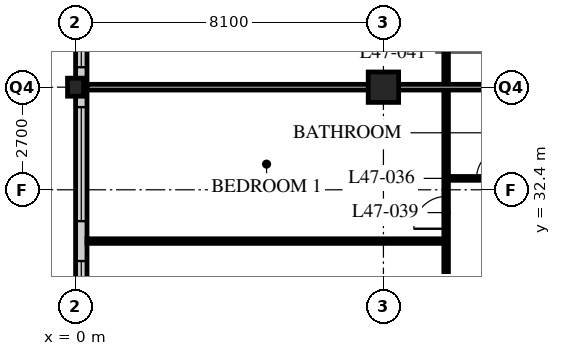
"""IFC4 building model, lengths in metres.
Left out: names, types, materials, properties, quantities, classifications, styles, units other than length and angle.
Written with IfcOpenShell. Run it as: python <this file> out.ifc"""

import sys

from ifc_helpers import new_model, si_unit, direction, frame, frame_2d, origin, origin_2d, place, context, subcontext, project, spatial, rectangle, hollow_rectangle, i_section, extrude, element, fill, save


model = new_model("IFC4")
c1 = context("Model", 3, precision=1e-05, world=origin(), true_north=direction((0.0, 1.0)))
c2 = subcontext(c1, "Body", "Model", "MODEL_VIEW")
j1 = project(units=[si_unit("LENGTHUNIT", "METRE"), si_unit("PLANEANGLEUNIT", "RADIAN")], contexts=[c1])
p1 = place(None, origin())
s1 = spatial("IfcSite", under=j1, at=p1, CompositionType="ELEMENT")
p2 = place(p1, origin())
s2 = spatial("IfcBuilding", under=s1, at=p2, CompositionType="ELEMENT")
p3 = place(p2, frame((0.0, 0.0, 184.8)))
s3 = spatial("IfcBuildingStorey", under=s2, at=p3, CompositionType="ELEMENT", Elevation=184.8)
p4 = place(p3, frame((0.0, 35.1, 0.0), z_axis=(0.0, 0.0, 1.0), x_axis=(1.0, 0.0, 0.0)))
e1 = element("IfcColumn", 1, at=p4, inside=s3, PredefinedType="COLUMN", context=c2, shape_type="SweptSolid", body=[
    extrude(i_section(OverallWidth=0.424, OverallDepth=0.475, WebThickness=0.048, FlangeThickness=0.077, FilletRadius=0.015, at=origin_2d()), origin(), (0.0, 0.0, 1.0), 3.6),
])
p5 = place(p3, frame((8.1, 35.1, 0.0), z_axis=(0.0, 0.0, 1.0), x_axis=(1.0, 0.0, 0.0)))
e2 = element("IfcColumn", 2, at=p5, inside=s3, PredefinedType="COLUMN", context=c2, shape_type="SweptSolid", body=[
    extrude(hollow_rectangle(XDim=0.8, YDim=0.8, WallThickness=0.08, at=origin_2d()), origin(), (0.0, 0.0, 1.0), 3.6),
])
p6 = place(p3, frame((0.15, 51.0, 0.0), z_axis=(0.0, 0.0, 1.0), x_axis=(0.0, -1.0, 0.0)))
e3 = element("IfcWall", 3, at=p6, inside=s3, PredefinedType="SOLIDWALL", context=c2, shape_type="SweptSolid", body=[
    extrude(rectangle(XDim=32.1, YDim=0.3, at=frame_2d((16.05, 0.0))), origin(), (0.0, 0.0, 1.0), 3.39),
])
p7 = place(p6, frame((0.225, 0.0, 0.6)))
e4 = element("IfcOpeningElement", 4, at=p7, cuts=e3, PredefinedType="OPENING", context=c2, shape_type="SweptSolid", body=[
    extrude(rectangle(XDim=3.0, YDim=2.4, at=frame_2d((1.5, 1.2))), frame((0.0, 0.16, 0.0), z_axis=(0.0, -1.0, 0.0), x_axis=(1.0, 0.0, 0.0)), (0.0, 0.0, 1.0), 0.32),
])
p8 = place(p6, frame((4.275, 0.0, 0.6)))
e5 = element("IfcOpeningElement", 5, at=p8, cuts=e3, PredefinedType="OPENING", context=c2, shape_type="SweptSolid", body=[
    extrude(rectangle(XDim=3.0, YDim=2.4, at=frame_2d((1.5, 1.2))), frame((0.0, 0.16, 0.0), z_axis=(0.0, -1.0, 0.0), x_axis=(1.0, 0.0, 0.0)), (0.0, 0.0, 1.0), 0.32),
])
p9 = place(p6, frame((8.325, 0.0, 0.6)))
e6 = element("IfcOpeningElement", 6, at=p9, cuts=e3, PredefinedType="OPENING", context=c2, shape_type="SweptSolid", body=[
    extrude(rectangle(XDim=3.0, YDim=2.4, at=frame_2d((1.5, 1.2))), frame((0.0, 0.16, 0.0), z_axis=(0.0, -1.0, 0.0), x_axis=(1.0, 0.0, 0.0)), (0.0, 0.0, 1.0), 0.32),
])
p10 = place(p6, frame((12.375, 0.0, 0.6)))
e7 = element("IfcOpeningElement", 7, at=p10, cuts=e3, PredefinedType="OPENING", context=c2, shape_type="SweptSolid", body=[
    extrude(rectangle(XDim=3.0, YDim=2.4, at=frame_2d((1.5, 1.2))), frame((0.0, 0.16, 0.0), z_axis=(0.0, -1.0, 0.0), x_axis=(1.0, 0.0, 0.0)), (0.0, 0.0, 1.0), 0.32),
])
p11 = place(p6, frame((16.425, 0.0, 0.6)))
e8 = element("IfcOpeningElement", 8, at=p11, cuts=e3, PredefinedType="OPENING", context=c2, shape_type="SweptSolid", body=[
    extrude(rectangle(XDim=3.0, YDim=2.4, at=frame_2d((1.5, 1.2))), frame((0.0, 0.16, 0.0), z_axis=(0.0, -1.0, 0.0), x_axis=(1.0, 0.0, 0.0)), (0.0, 0.0, 1.0), 0.32),
])
p12 = place(p6, frame((20.475, 0.0, 0.6)))
e9 = element("IfcOpeningElement", 9, at=p12, cuts=e3, PredefinedType="OPENING", context=c2, shape_type="SweptSolid", body=[
    extrude(rectangle(XDim=3.0, YDim=2.4, at=frame_2d((1.5, 1.2))), frame((0.0, 0.16, 0.0), z_axis=(0.0, -1.0, 0.0), x_axis=(1.0, 0.0, 0.0)), (0.0, 0.0, 1.0), 0.32),
])
p13 = place(p6, frame((24.525, 0.0, 0.6)))
e10 = element("IfcOpeningElement", 10, at=p13, cuts=e3, PredefinedType="OPENING", context=c2, shape_type="SweptSolid", body=[
    extrude(rectangle(XDim=3.0, YDim=2.4, at=frame_2d((1.5, 1.2))), frame((0.0, 0.16, 0.0), z_axis=(0.0, -1.0, 0.0), x_axis=(1.0, 0.0, 0.0)), (0.0, 0.0, 1.0), 0.32),
])
p14 = place(p6, frame((28.575, 0.0, 0.6)))
e11 = element("IfcOpeningElement", 11, at=p14, cuts=e3, PredefinedType="OPENING", context=c2, shape_type="SweptSolid", body=[
    extrude(rectangle(XDim=3.0, YDim=2.4, at=frame_2d((1.5, 1.2))), frame((0.0, 0.16, 0.0), z_axis=(0.0, -1.0, 0.0), x_axis=(1.0, 0.0, 0.0)), (0.0, 0.0, 1.0), 0.32),
])
p15 = place(p3, frame((9.75, 27.0, 0.0), z_axis=(0.0, 0.0, 1.0), x_axis=(0.0, 1.0, 0.0)))
e12 = element("IfcWall", 12, at=p15, inside=s3, PredefinedType="PARTITIONING", context=c2, shape_type="SweptSolid", body=[
    extrude(rectangle(XDim=16.2, YDim=0.12, at=frame_2d((8.1, 0.0))), origin(), (0.0, 0.0, 1.0), 3.39),
])
p16 = place(p15, frame((0.975, 0.0, 0.0)))
e13 = element("IfcOpeningElement", 13, at=p16, cuts=e12, PredefinedType="OPENING", context=c2, shape_type="SweptSolid", body=[
    extrude(rectangle(XDim=0.85, YDim=2.1, at=frame_2d((0.425, 1.05))), frame((0.0, 0.07, 0.0), z_axis=(0.0, -1.0, 0.0), x_axis=(1.0, 0.0, 0.0)), (0.0, 0.0, 1.0), 0.14),
])
p17 = place(p15, frame((4.375, 0.0, 0.0)))
e14 = element("IfcOpeningElement", 14, at=p17, cuts=e12, PredefinedType="OPENING", context=c2, shape_type="SweptSolid", body=[
    extrude(rectangle(XDim=0.85, YDim=2.1, at=frame_2d((0.425, 1.05))), frame((0.0, 0.07, 0.0), z_axis=(0.0, -1.0, 0.0), x_axis=(1.0, 0.0, 0.0)), (0.0, 0.0, 1.0), 0.14),
])
p18 = place(p15, frame((9.075, 0.0, 0.0)))
e15 = element("IfcOpeningElement", 15, at=p18, cuts=e12, PredefinedType="OPENING", context=c2, shape_type="SweptSolid", body=[
    extrude(rectangle(XDim=0.85, YDim=2.1, at=frame_2d((0.425, 1.05))), frame((0.0, 0.07, 0.0), z_axis=(0.0, -1.0, 0.0), x_axis=(1.0, 0.0, 0.0)), (0.0, 0.0, 1.0), 0.14),
])
p19 = place(p15, frame((12.475, 0.0, 0.0)))
e16 = element("IfcOpeningElement", 16, at=p19, cuts=e12, PredefinedType="OPENING", context=c2, shape_type="SweptSolid", body=[
    extrude(rectangle(XDim=0.85, YDim=2.1, at=frame_2d((0.425, 1.05))), frame((0.0, 0.07, 0.0), z_axis=(0.0, -1.0, 0.0), x_axis=(1.0, 0.0, 0.0)), (0.0, 0.0, 1.0), 0.14),
])
p20 = place(p3, frame((12.15, 32.7, 0.0), z_axis=(0.0, 0.0, 1.0), x_axis=(-1.0, 0.0, 0.0)))
e17 = element("IfcWall", 17, at=p20, inside=s3, PredefinedType="PARTITIONING", context=c2, shape_type="SweptSolid", body=[
    extrude(rectangle(XDim=2.4, YDim=0.1, at=frame_2d((1.2, 0.0))), origin(), (0.0, 0.0, 1.0), 3.39),
])
p21 = place(p20, frame((0.8, 0.0, 0.0)))
e18 = element("IfcOpeningElement", 18, at=p21, cuts=e17, PredefinedType="OPENING", context=c2, shape_type="SweptSolid", body=[
    extrude(rectangle(XDim=0.8, YDim=2.1, at=frame_2d((0.4, 1.05))), frame((0.0, 0.06, 0.0), z_axis=(0.0, -1.0, 0.0), x_axis=(1.0, 0.0, 0.0)), (0.0, 0.0, 1.0), 0.12),
])
p22 = place(p3, frame((9.75, 31.05, 0.0), z_axis=(0.0, 0.0, 1.0), x_axis=(-1.0, 0.0, 0.0)))
e19 = element("IfcWall", 19, at=p22, inside=s3, PredefinedType="PARTITIONING", context=c2, shape_type="SweptSolid", body=[
    extrude(rectangle(XDim=9.45, YDim=0.12, at=frame_2d((4.725, 0.0))), origin(), (0.0, 0.0, 1.0), 3.39),
])
p23 = place(p3, frame((12.15, 35.1, 0.0), z_axis=(0.0, 0.0, 1.0), x_axis=(-1.0, 0.0, 0.0)))
e20 = element("IfcWall", 20, at=p23, inside=s3, PredefinedType="PARTITIONING", context=c2, shape_type="SweptSolid", body=[
    extrude(rectangle(XDim=11.85, YDim=0.15, at=frame_2d((5.925, 0.0))), origin(), (0.0, 0.0, 1.0), 2.778),
])
p24 = place(p10, origin())
e21 = element("IfcWindow", 21, at=p24, inside=s3, PartitioningType="SINGLE_PANEL", PredefinedType="WINDOW", context=c2, shape_type="SweptSolid", body=[
    extrude(rectangle(XDim=3.0, YDim=2.4, at=frame_2d((1.5, 1.2))), frame((0.0, 0.03, 0.0), z_axis=(0.0, -1.0, 0.0), x_axis=(1.0, 0.0, 0.0)), (0.0, 0.0, 1.0), 0.06),
])
fill(e7, e21)
p25 = place(p11, origin())
e22 = element("IfcWindow", 22, at=p25, inside=s3, PartitioningType="SINGLE_PANEL", PredefinedType="WINDOW", context=c2, shape_type="SweptSolid", body=[
    extrude(rectangle(XDim=3.0, YDim=2.4, at=frame_2d((1.5, 1.2))), frame((0.0, 0.03, 0.0), z_axis=(0.0, -1.0, 0.0), x_axis=(1.0, 0.0, 0.0)), (0.0, 0.0, 1.0), 0.06),
])
fill(e8, e22)
p26 = place(p12, origin())
e23 = element("IfcWindow", 23, at=p26, inside=s3, PartitioningType="SINGLE_PANEL", PredefinedType="WINDOW", context=c2, shape_type="SweptSolid", body=[
    extrude(rectangle(XDim=3.0, YDim=2.4, at=frame_2d((1.5, 1.2))), frame((0.0, 0.03, 0.0), z_axis=(0.0, -1.0, 0.0), x_axis=(1.0, 0.0, 0.0)), (0.0, 0.0, 1.0), 0.06),
])
fill(e9, e23)
p27 = place(p21, origin())
e24 = element("IfcDoor", 24, at=p27, inside=s3, OperationType="SINGLE_SWING_RIGHT", PredefinedType="DOOR", context=c2, shape_type="SweptSolid", body=[
    extrude(rectangle(XDim=0.8, YDim=2.1, at=frame_2d((0.4, 1.05))), frame((0.0, 0.025, 0.0), z_axis=(0.0, -1.0, 0.0), x_axis=(1.0, 0.0, 0.0)), (0.0, 0.0, 1.0), 0.05),
])
fill(e18, e24)
p28 = place(p17, origin())
e25 = element("IfcDoor", 25, at=p28, inside=s3, OperationType="SINGLE_SWING_LEFT", PredefinedType="DOOR", context=c2, shape_type="SweptSolid", body=[
    extrude(rectangle(XDim=0.85, YDim=2.1, at=frame_2d((0.425, 1.05))), frame((0.0, 0.025, 0.0), z_axis=(0.0, -1.0, 0.0), x_axis=(1.0, 0.0, 0.0)), (0.0, 0.0, 1.0), 0.05),
])
fill(e14, e25)
save(model, sys.argv[1])
